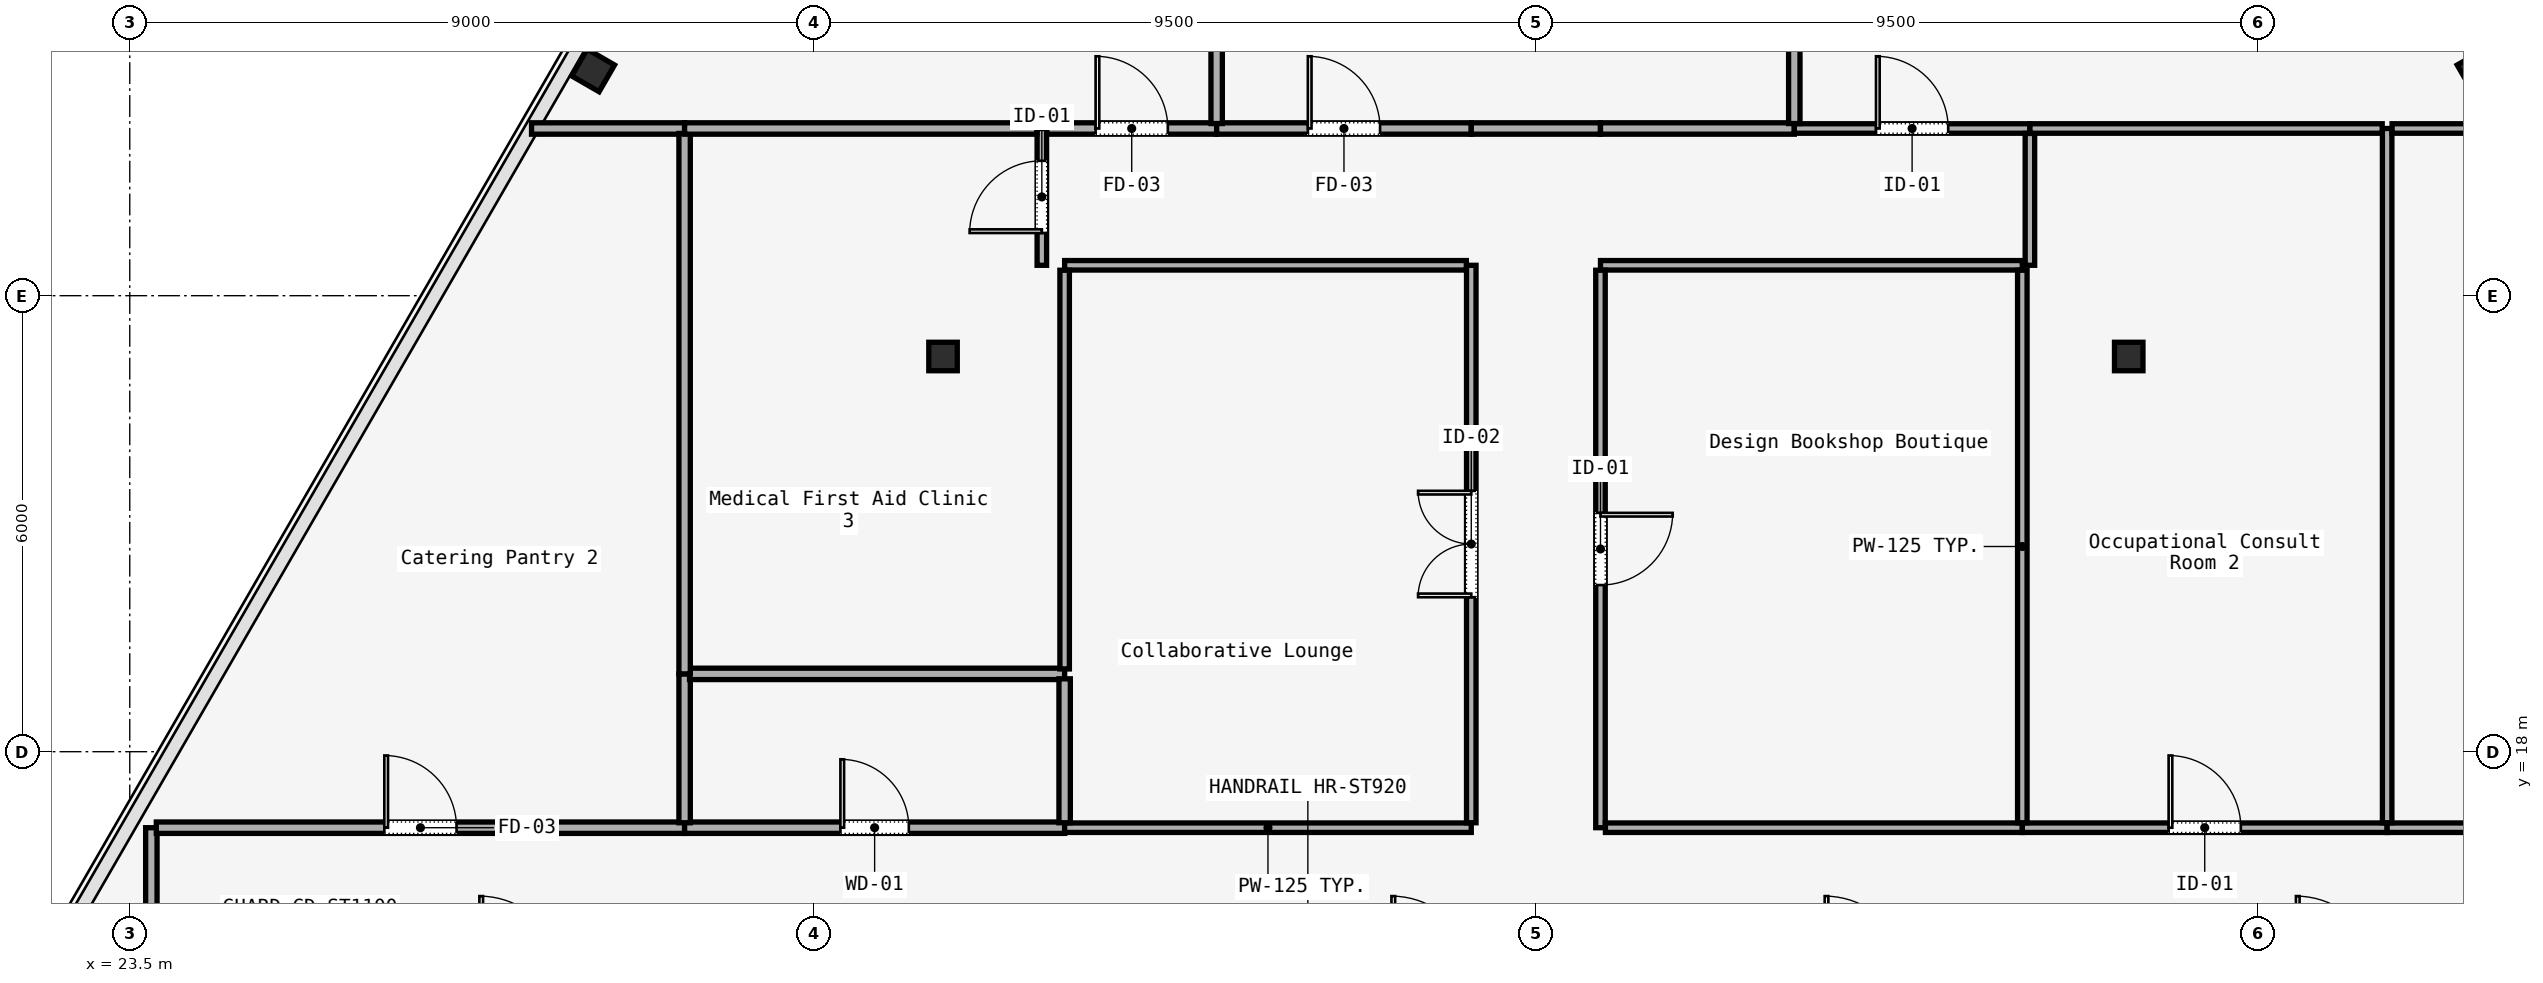
"""IFC4 building model, lengths in metres.
Left out: names, types, materials, properties, quantities, classifications, styles, units other than length and angle.
Written with IfcOpenShell. Run it as: python <this file> out.ifc"""

import sys

from ifc_helpers import new_model, si_unit, direction, frame, frame_2d, origin, origin_2d, place, context, subcontext, project, spatial, rectangle, i_section, extrude, element, fill, save


model = new_model("IFC4")
c1 = context("Model", 3, precision=1e-05, world=origin(), true_north=direction((0.0, 1.0)))
c2 = subcontext(c1, "Body", "Model", "MODEL_VIEW")
j1 = project(units=[si_unit("LENGTHUNIT", "METRE"), si_unit("PLANEANGLEUNIT", "RADIAN")], contexts=[c1])
p1 = place(None, origin())
s1 = spatial("IfcSite", under=j1, at=p1, CompositionType="ELEMENT")
p2 = place(p1, origin())
s2 = spatial("IfcBuilding", under=s1, at=p2, CompositionType="ELEMENT")
p3 = place(p2, frame((0.0, 0.0, 263.6)))
s3 = spatial("IfcBuildingStorey", under=s2, at=p3, CompositionType="ELEMENT", Elevation=263.6)
for number, where, z_axis, x_axis in (
    (1, (34.2, 23.2, 0.0), (0.0, 0.0, 1.0), (1.0, 0.0, 0.0)),
    (2, (49.8, 23.2, 0.0), (0.0, 0.0, 1.0), (1.0, 0.0, 0.0)),
):
    element("IfcColumn", number, at=place(p3, frame(where, z_axis=z_axis, x_axis=x_axis)), inside=s3, PredefinedType="COLUMN", context=c2, shape_type="SweptSolid", body=[
        extrude(i_section(OverallWidth=0.375, OverallDepth=0.375, WebThickness=0.017, FlangeThickness=0.027, FilletRadius=0.015, at=origin_2d()), origin(), (0.0, 0.0, 1.0), 3.58),
    ])
for number, where, z_axis, x_axis in (
    (3, (54.404, 26.964, 0.0), (0.0, 0.0, 1.0), (-0.5, 0.866, 0.0)),
    (4, (29.596, 26.964, 0.0), (0.0, 0.0, 1.0), (0.5, 0.866, 0.0)),
):
    element("IfcColumn", number, at=place(p3, frame(where, z_axis=z_axis, x_axis=x_axis)), inside=s3, PredefinedType="COLUMN", context=c2, shape_type="SweptSolid", body=[
        extrude(i_section(OverallWidth=0.406, OverallDepth=0.416, WebThickness=0.03, FlangeThickness=0.037, FilletRadius=0.015, at=origin_2d()), origin(), (0.0, 0.0, 1.0), 3.58),
    ])
p4 = place(p3, frame((23.784, 15.215, 0.0), z_axis=(0.0, 0.0, 1.0), x_axis=(0.0, 1.0, 0.0)))
e5 = element("IfcWall", 5, at=p4, inside=s3, PredefinedType="PARTITIONING", context=c2, shape_type="SweptSolid", body=[
    extrude(rectangle(XDim=1.785, YDim=0.15, at=frame_2d((0.893, 0.0))), origin(), (0.0, 0.0, 1.0), 3.01),
])
p5 = place(p3, frame((23.849, 17.0, 0.0), z_axis=(0.0, 0.0, 1.0), x_axis=(1.0, 0.0, 0.0)))
e6 = element("IfcWall", 6, at=p5, inside=s3, PredefinedType="PARTITIONING", context=c2, shape_type="SweptSolid", body=[
    extrude(rectangle(XDim=6.951, YDim=0.15, at=frame_2d((3.476, 0.0))), origin(), (0.0, 0.0, 1.0), 3.01),
])
p6 = place(p5, frame((3.0, 0.0, 0.0)))
e7 = element("IfcOpeningElement", 7, at=p6, cuts=e6, PredefinedType="OPENING", context=c2, shape_type="SweptSolid", body=[
    extrude(rectangle(XDim=0.95, YDim=2.2, at=frame_2d((0.475, 1.1))), frame((0.0, 0.075, 0.0), z_axis=(0.0, -1.0, 0.0), x_axis=(1.0, 0.0, 0.0)), (0.0, 0.0, 1.0), 0.15),
])
p7 = place(p3, frame((30.8, 17.0, 0.0), z_axis=(0.0, 0.0, 1.0), x_axis=(1.0, 0.0, 0.0)))
e8 = element("IfcWall", 8, at=p7, inside=s3, PredefinedType="PARTITIONING", context=c2, shape_type="SweptSolid", body=[
    extrude(rectangle(XDim=5.0, YDim=0.15, at=frame_2d((2.5, 0.0))), origin(), (0.0, 0.0, 1.0), 3.01),
])
p8 = place(p7, frame((2.05, 0.0, 0.0)))
e9 = element("IfcOpeningElement", 9, at=p8, cuts=e8, PredefinedType="OPENING", context=c2, shape_type="SweptSolid", body=[
    extrude(rectangle(XDim=0.9, YDim=2.15, at=frame_2d((0.45, 1.075))), frame((0.0, 0.075, 0.0), z_axis=(0.0, -1.0, 0.0), x_axis=(1.0, 0.0, 0.0)), (0.0, 0.0, 1.0), 0.15),
])
p9 = place(p3, frame((35.8, 17.0, 0.0), z_axis=(0.0, 0.0, 1.0), x_axis=(1.0, 0.0, 0.0)))
e10 = element("IfcWall", 10, at=p9, inside=s3, PredefinedType="PARTITIONING", context=c2, shape_type="SweptSolid", body=[
    extrude(rectangle(XDim=5.35, YDim=0.125, at=frame_2d((2.675, 0.0))), origin(), (0.0, 0.0, 1.0), 3.01),
])
p10 = place(p3, frame((41.15, 17.065, 0.0), z_axis=(0.0, 0.0, 1.0), x_axis=(0.0, 1.0, 0.0)))
e11 = element("IfcWall", 11, at=p10, inside=s3, PredefinedType="PARTITIONING", context=c2, shape_type="SweptSolid", body=[
    extrude(rectangle(XDim=7.335, YDim=0.125, at=frame_2d((3.667, 0.0))), origin(), (0.0, 0.0, 1.0), 3.01),
])
p11 = place(p10, frame((2.968, 0.0, 0.0)))
e12 = element("IfcOpeningElement", 12, at=p11, cuts=e11, PredefinedType="OPENING", context=c2, shape_type="SweptSolid", body=[
    extrude(rectangle(XDim=1.4, YDim=2.2, at=frame_2d((0.7, 1.1))), frame((0.0, 0.062, 0.0), z_axis=(0.0, -1.0, 0.0), x_axis=(1.0, 0.0, 0.0)), (0.0, 0.0, 1.0), 0.125),
])
p12 = place(p3, frame((41.085, 24.4, 0.0), z_axis=(0.0, 0.0, 1.0), x_axis=(-1.0, 0.0, 0.0)))
e13 = element("IfcWall", 13, at=p12, inside=s3, PredefinedType="PARTITIONING", context=c2, shape_type="SweptSolid", body=[
    extrude(rectangle(XDim=5.285, YDim=0.125, at=frame_2d((2.643, 0.0))), origin(), (0.0, 0.0, 1.0), 3.01),
])
p13 = place(p3, frame((35.5, 24.4, 0.0), z_axis=(0.0, 0.0, 1.0), x_axis=(0.0, 1.0, 0.0)))
e14 = element("IfcWall", 14, at=p13, inside=s3, PredefinedType="PARTITIONING", context=c2, shape_type="SweptSolid", body=[
    extrude(rectangle(XDim=1.8, YDim=0.125, at=frame_2d((0.9, 0.0))), origin(), (0.0, 0.0, 1.0), 3.01),
])
p14 = place(p13, frame((0.425, 0.0, 0.0)))
e15 = element("IfcOpeningElement", 15, at=p14, cuts=e14, PredefinedType="OPENING", context=c2, shape_type="SweptSolid", body=[
    extrude(rectangle(XDim=0.95, YDim=2.2, at=frame_2d((0.475, 1.1))), frame((0.0, 0.062, 0.0), z_axis=(0.0, -1.0, 0.0), x_axis=(1.0, 0.0, 0.0)), (0.0, 0.0, 1.0), 0.125),
])
p15 = place(p3, frame((35.565, 26.2, 0.0), z_axis=(0.0, 0.0, 1.0), x_axis=(1.0, 0.0, 0.0)))
e16 = element("IfcWall", 16, at=p15, inside=s3, PredefinedType="PARTITIONING", context=c2, shape_type="SweptSolid", body=[
    extrude(rectangle(XDim=2.235, YDim=0.15, at=frame_2d((1.118, 0.0))), origin(), (0.0, 0.0, 1.0), 3.01),
])
p16 = place(p15, frame((0.643, 0.0, 0.0)))
e17 = element("IfcOpeningElement", 17, at=p16, cuts=e16, PredefinedType="OPENING", context=c2, shape_type="SweptSolid", body=[
    extrude(rectangle(XDim=0.95, YDim=2.2, at=frame_2d((0.475, 1.1))), frame((0.0, 0.075, 0.0), z_axis=(0.0, -1.0, 0.0), x_axis=(1.0, 0.0, 0.0)), (0.0, 0.0, 1.0), 0.15),
])
p17 = place(p3, frame((37.8, 26.2, 0.0), z_axis=(0.0, 0.0, 1.0), x_axis=(1.0, 0.0, 0.0)))
e18 = element("IfcWall", 18, at=p17, inside=s3, PredefinedType="PARTITIONING", context=c2, shape_type="SweptSolid", body=[
    extrude(rectangle(XDim=3.35, YDim=0.15, at=frame_2d((1.675, 0.0))), origin(), (0.0, 0.0, 1.0), 3.01),
])
p18 = place(p17, frame((1.2, 0.0, 0.0)))
e19 = element("IfcOpeningElement", 19, at=p18, cuts=e18, PredefinedType="OPENING", context=c2, shape_type="SweptSolid", body=[
    extrude(rectangle(XDim=0.95, YDim=2.2, at=frame_2d((0.475, 1.1))), frame((0.0, 0.075, 0.0), z_axis=(0.0, -1.0, 0.0), x_axis=(1.0, 0.0, 0.0)), (0.0, 0.0, 1.0), 0.15),
])
p19 = place(p3, frame((41.15, 26.2, 0.0), z_axis=(0.0, 0.0, 1.0), x_axis=(1.0, 0.0, 0.0)))
e20 = element("IfcWall", 20, at=p19, inside=s3, PredefinedType="PARTITIONING", context=c2, shape_type="SweptSolid", body=[
    extrude(rectangle(XDim=1.7, YDim=0.15, at=frame_2d((0.85, 0.0))), origin(), (0.0, 0.0, 1.0), 3.01),
])
p20 = place(p3, frame((42.85, 26.2, 0.0), z_axis=(0.0, 0.0, 1.0), x_axis=(1.0, 0.0, 0.0)))
e21 = element("IfcWall", 21, at=p20, inside=s3, PredefinedType="PARTITIONING", context=c2, shape_type="SweptSolid", body=[
    extrude(rectangle(XDim=2.55, YDim=0.15, at=frame_2d((1.275, 0.0))), origin(), (0.0, 0.0, 1.0), 3.01),
])
p21 = place(p3, frame((45.4, 26.2, 0.0), z_axis=(0.0, 0.0, 1.0), x_axis=(1.0, 0.0, 0.0)))
e22 = element("IfcWall", 22, at=p21, inside=s3, PredefinedType="PARTITIONING", context=c2, shape_type="SweptSolid", body=[
    extrude(rectangle(XDim=3.1, YDim=0.125, at=frame_2d((1.55, 0.0))), origin(), (0.0, 0.0, 1.0), 3.01),
])
p22 = place(p21, frame((1.075, 0.0, 0.0)))
e23 = element("IfcOpeningElement", 23, at=p22, cuts=e22, PredefinedType="OPENING", context=c2, shape_type="SweptSolid", body=[
    extrude(rectangle(XDim=0.95, YDim=2.2, at=frame_2d((0.475, 1.1))), frame((0.0, 0.062, 0.0), z_axis=(0.0, -1.0, 0.0), x_axis=(1.0, 0.0, 0.0)), (0.0, 0.0, 1.0), 0.125),
])
p23 = place(p3, frame((48.5, 26.135, 0.0), z_axis=(0.0, 0.0, 1.0), x_axis=(0.0, -1.0, 0.0)))
e24 = element("IfcWall", 24, at=p23, inside=s3, PredefinedType="PARTITIONING", context=c2, shape_type="SweptSolid", body=[
    extrude(rectangle(XDim=1.735, YDim=0.125, at=frame_2d((0.868, 0.0))), origin(), (0.0, 0.0, 1.0), 3.01),
])
p24 = place(p3, frame((48.4, 24.4, 0.0), z_axis=(0.0, 0.0, 1.0), x_axis=(-1.0, 0.0, 0.0)))
e25 = element("IfcWall", 25, at=p24, inside=s3, PredefinedType="PARTITIONING", context=c2, shape_type="SweptSolid", body=[
    extrude(rectangle(XDim=5.55, YDim=0.125, at=frame_2d((2.775, 0.0))), origin(), (0.0, 0.0, 1.0), 3.01),
])
p25 = place(p3, frame((42.85, 24.335, 0.0), z_axis=(0.0, 0.0, 1.0), x_axis=(0.0, -1.0, 0.0)))
e26 = element("IfcWall", 26, at=p25, inside=s3, PredefinedType="PARTITIONING", context=c2, shape_type="SweptSolid", body=[
    extrude(rectangle(XDim=7.335, YDim=0.125, at=frame_2d((3.667, 0.0))), origin(), (0.0, 0.0, 1.0), 3.01),
])
p26 = place(p25, frame((3.192, 0.0, 0.0)))
e27 = element("IfcOpeningElement", 27, at=p26, cuts=e26, PredefinedType="OPENING", context=c2, shape_type="SweptSolid", body=[
    extrude(rectangle(XDim=0.95, YDim=2.2, at=frame_2d((0.475, 1.1))), frame((0.0, 0.062, 0.0), z_axis=(0.0, -1.0, 0.0), x_axis=(1.0, 0.0, 0.0)), (0.0, 0.0, 1.0), 0.125),
])
p27 = place(p3, frame((42.915, 17.0, 0.0), z_axis=(0.0, 0.0, 1.0), x_axis=(1.0, 0.0, 0.0)))
e28 = element("IfcWall", 28, at=p27, inside=s3, PredefinedType="PARTITIONING", context=c2, shape_type="SweptSolid", body=[
    extrude(rectangle(XDim=5.485, YDim=0.125, at=frame_2d((2.742, 0.0))), origin(), (0.0, 0.0, 1.0), 3.01),
])
p28 = place(p3, frame((48.4, 17.0, 0.0), z_axis=(0.0, 0.0, 1.0), x_axis=(1.0, 0.0, 0.0)))
e29 = element("IfcWall", 29, at=p28, inside=s3, PredefinedType="PARTITIONING", context=c2, shape_type="SweptSolid", body=[
    extrude(rectangle(XDim=4.8, YDim=0.125, at=frame_2d((2.4, 0.0))), origin(), (0.0, 0.0, 1.0), 3.01),
])
p29 = place(p28, frame((1.925, 0.0, 0.0)))
e30 = element("IfcOpeningElement", 30, at=p29, cuts=e29, PredefinedType="OPENING", context=c2, shape_type="SweptSolid", body=[
    extrude(rectangle(XDim=0.95, YDim=2.2, at=frame_2d((0.475, 1.1))), frame((0.0, 0.062, 0.0), z_axis=(0.0, -1.0, 0.0), x_axis=(1.0, 0.0, 0.0)), (0.0, 0.0, 1.0), 0.125),
])
p30 = place(p3, frame((53.2, 17.0, 0.0), z_axis=(0.0, 0.0, 1.0), x_axis=(1.0, 0.0, 0.0)))
e31 = element("IfcWall", 31, at=p30, inside=s3, PredefinedType="PARTITIONING", context=c2, shape_type="SweptSolid", body=[
    extrude(rectangle(XDim=6.951, YDim=0.125, at=frame_2d((3.476, 0.0))), origin(), (0.0, 0.0, 1.0), 3.01),
])
p31 = place(p30, frame((3.0, 0.0, 0.0)))
e32 = element("IfcOpeningElement", 32, at=p31, cuts=e31, PredefinedType="OPENING", context=c2, shape_type="SweptSolid", body=[
    extrude(rectangle(XDim=0.95, YDim=2.2, at=frame_2d((0.475, 1.1))), frame((0.0, 0.062, 0.0), z_axis=(0.0, -1.0, 0.0), x_axis=(1.0, 0.0, 0.0)), (0.0, 0.0, 1.0), 0.125),
])
p32 = place(p3, frame((30.8, 17.065, 0.0), z_axis=(0.0, 0.0, 1.0), x_axis=(0.0, 1.0, 0.0)))
e33 = element("IfcWall", 33, at=p32, inside=s3, PredefinedType="PARTITIONING", context=c2, shape_type="SweptSolid", body=[
    extrude(rectangle(XDim=1.959, YDim=0.15, at=frame_2d((0.979, 0.0))), origin(), (0.0, 0.0, 1.0), 3.01),
])
p33 = place(p3, frame((30.865, 19.024, 0.0), z_axis=(0.0, 0.0, 1.0), x_axis=(1.0, 0.0, 0.0)))
e34 = element("IfcWall", 34, at=p33, inside=s3, PredefinedType="PARTITIONING", context=c2, shape_type="SweptSolid", body=[
    extrude(rectangle(XDim=4.935, YDim=0.15, at=frame_2d((2.468, 0.0))), origin(), (0.0, 0.0, 1.0), 3.01),
])
p34 = place(p3, frame((35.8, 18.959, 0.0), z_axis=(0.0, 0.0, 1.0), x_axis=(0.0, -1.0, 0.0)))
e35 = element("IfcWall", 35, at=p34, inside=s3, PredefinedType="PARTITIONING", context=c2, shape_type="SweptSolid", body=[
    extrude(rectangle(XDim=1.894, YDim=0.15, at=frame_2d((0.947, 0.0))), origin(), (0.0, 0.0, 1.0), 3.01),
])
p35 = place(p3, frame((35.8, 19.089, 0.0), z_axis=(0.0, 0.0, 1.0), x_axis=(0.0, 1.0, 0.0)))
e36 = element("IfcWall", 36, at=p35, inside=s3, PredefinedType="PARTITIONING", context=c2, shape_type="SweptSolid", body=[
    extrude(rectangle(XDim=5.246, YDim=0.125, at=frame_2d((2.623, 0.0))), origin(), (0.0, 0.0, 1.0), 3.01),
])
p36 = place(p3, frame((48.4, 24.335, 0.0), z_axis=(0.0, 0.0, 1.0), x_axis=(0.0, -1.0, 0.0)))
e37 = element("IfcWall", 37, at=p36, inside=s3, PredefinedType="PARTITIONING", context=c2, shape_type="SweptSolid", body=[
    extrude(rectangle(XDim=7.27, YDim=0.125, at=frame_2d((3.635, 0.0))), origin(), (0.0, 0.0, 1.0), 3.01),
])
p37 = place(p3, frame((28.786, 26.2, 0.0), z_axis=(0.0, 0.0, 1.0), x_axis=(1.0, 0.0, 0.0)))
e38 = element("IfcWall", 38, at=p37, inside=s3, PredefinedType="PARTITIONING", context=c2, shape_type="SweptSolid", body=[
    extrude(rectangle(XDim=2.014, YDim=0.15, at=frame_2d((1.007, 0.0))), origin(), (0.0, 0.0, 1.0), 3.01),
])
p38 = place(p3, frame((30.8, 26.135, 0.0), z_axis=(0.0, 0.0, 1.0), x_axis=(0.0, -1.0, 0.0)))
e39 = element("IfcWall", 39, at=p38, inside=s3, PredefinedType="PARTITIONING", context=c2, shape_type="SweptSolid", body=[
    extrude(rectangle(XDim=7.111, YDim=0.15, at=frame_2d((3.556, 0.0))), origin(), (0.0, 0.0, 1.0), 3.01),
])
p39 = place(p3, frame((53.2, 17.065, 0.0), z_axis=(0.0, 0.0, 1.0), x_axis=(0.0, 1.0, 0.0)))
e40 = element("IfcWall", 40, at=p39, inside=s3, PredefinedType="PARTITIONING", context=c2, shape_type="SweptSolid", body=[
    extrude(rectangle(XDim=9.135, YDim=0.125, at=frame_2d((4.567, 0.0))), origin(), (0.0, 0.0, 1.0), 3.01),
])
p40 = place(p3, frame((53.265, 26.2, 0.0), z_axis=(0.0, 0.0, 1.0), x_axis=(1.0, 0.0, 0.0)))
e41 = element("IfcWall", 41, at=p40, inside=s3, PredefinedType="PARTITIONING", context=c2, shape_type="SweptSolid", body=[
    extrude(rectangle(XDim=1.949, YDim=0.125, at=frame_2d((0.975, 0.0))), origin(), (0.0, 0.0, 1.0), 3.01),
])
p41 = place(p3, frame((48.5, 26.2, 0.0), z_axis=(0.0, 0.0, 1.0), x_axis=(1.0, 0.0, 0.0)))
e42 = element("IfcWall", 42, at=p41, inside=s3, PredefinedType="PARTITIONING", context=c2, shape_type="SweptSolid", body=[
    extrude(rectangle(XDim=4.635, YDim=0.125, at=frame_2d((2.317, 0.0))), origin(), (0.0, 0.0, 1.0), 3.01),
])
p42 = place(p3, frame((30.8, 26.2, 0.0), z_axis=(0.0, 0.0, 1.0), x_axis=(1.0, 0.0, 0.0)))
e43 = element("IfcWall", 43, at=p42, inside=s3, PredefinedType="PARTITIONING", context=c2, shape_type="SweptSolid", body=[
    extrude(rectangle(XDim=4.635, YDim=0.15, at=frame_2d((2.317, 0.0))), origin(), (0.0, 0.0, 1.0), 3.01),
])
p43 = place(p3, frame((37.8, 41.813, 0.0), z_axis=(0.0, 0.0, 1.0), x_axis=(0.0, -1.0, 0.0)))
e44 = element("IfcWall", 44, at=p43, inside=s3, PredefinedType="PARTITIONING", context=c2, shape_type="SweptSolid", body=[
    extrude(rectangle(XDim=15.548, YDim=0.15, at=frame_2d((7.774, 0.0))), origin(), (0.0, 0.0, 1.0), 3.01),
])
p44 = place(p3, frame((45.4, 26.265, 0.0), z_axis=(0.0, 0.0, 1.0), x_axis=(0.0, 1.0, 0.0)))
e45 = element("IfcWall", 45, at=p44, inside=s3, PredefinedType="PARTITIONING", context=c2, shape_type="SweptSolid", body=[
    extrude(rectangle(XDim=16.933, YDim=0.15, at=frame_2d((8.467, 0.0))), origin(), (0.0, 0.0, 1.0), 3.01),
])
p45 = place(p8, origin())
e46 = element("IfcDoor", 46, at=p45, inside=s3, OperationType="SINGLE_SWING_RIGHT", PredefinedType="DOOR", context=c2, shape_type="SweptSolid", body=[
    extrude(rectangle(XDim=0.9, YDim=2.15, at=frame_2d((0.45, 1.075))), frame((0.0, 0.025, 0.0), z_axis=(0.0, -1.0, 0.0), x_axis=(1.0, 0.0, 0.0)), (0.0, 0.0, 1.0), 0.05),
])
fill(e9, e46)
p46 = place(p11, origin())
e47 = element("IfcDoor", 47, at=p46, inside=s3, OperationType="SINGLE_SWING_LEFT", PredefinedType="DOOR", context=c2, shape_type="SweptSolid", body=[
    extrude(rectangle(XDim=1.4, YDim=2.2, at=frame_2d((0.7, 1.1))), frame((0.0, 0.025, 0.0), z_axis=(0.0, -1.0, 0.0), x_axis=(1.0, 0.0, 0.0)), (0.0, 0.0, 1.0), 0.05),
])
fill(e12, e47)
p47 = place(p26, origin())
e48 = element("IfcDoor", 48, at=p47, inside=s3, OperationType="SINGLE_SWING_RIGHT", PredefinedType="DOOR", context=c2, shape_type="SweptSolid", body=[
    extrude(rectangle(XDim=0.95, YDim=2.2, at=frame_2d((0.475, 1.1))), frame((0.0, 0.025, 0.0), z_axis=(0.0, -1.0, 0.0), x_axis=(1.0, 0.0, 0.0)), (0.0, 0.0, 1.0), 0.05),
])
fill(e27, e48)
p48 = place(p6, origin())
e49 = element("IfcDoor", 49, at=p48, inside=s3, OperationType="SINGLE_SWING_LEFT", PredefinedType="DOOR", context=c2, shape_type="SweptSolid", body=[
    extrude(rectangle(XDim=0.95, YDim=2.2, at=frame_2d((0.475, 1.1))), frame((0.0, 0.025, 0.0), z_axis=(0.0, -1.0, 0.0), x_axis=(1.0, 0.0, 0.0)), (0.0, 0.0, 1.0), 0.05),
])
fill(e7, e49)
p49 = place(p29, origin())
e50 = element("IfcDoor", 50, at=p49, inside=s3, OperationType="SINGLE_SWING_LEFT", PredefinedType="DOOR", context=c2, shape_type="SweptSolid", body=[
    extrude(rectangle(XDim=0.95, YDim=2.2, at=frame_2d((0.475, 1.1))), frame((0.0, 0.025, 0.0), z_axis=(0.0, -1.0, 0.0), x_axis=(1.0, 0.0, 0.0)), (0.0, 0.0, 1.0), 0.05),
])
fill(e30, e50)
p50 = place(p14, origin())
e51 = element("IfcDoor", 51, at=p50, inside=s3, OperationType="SINGLE_SWING_RIGHT", PredefinedType="DOOR", context=c2, shape_type="SweptSolid", body=[
    extrude(rectangle(XDim=0.95, YDim=2.2, at=frame_2d((0.475, 1.1))), frame((0.0, 0.025, 0.0), z_axis=(0.0, -1.0, 0.0), x_axis=(1.0, 0.0, 0.0)), (0.0, 0.0, 1.0), 0.05),
])
fill(e15, e51)
p51 = place(p16, origin())
e52 = element("IfcDoor", 52, at=p51, inside=s3, OperationType="SINGLE_SWING_LEFT", PredefinedType="DOOR", context=c2, shape_type="SweptSolid", body=[
    extrude(rectangle(XDim=0.95, YDim=2.2, at=frame_2d((0.475, 1.1))), frame((0.0, 0.025, 0.0), z_axis=(0.0, -1.0, 0.0), x_axis=(1.0, 0.0, 0.0)), (0.0, 0.0, 1.0), 0.05),
])
fill(e17, e52)
p52 = place(p22, origin())
e53 = element("IfcDoor", 53, at=p52, inside=s3, OperationType="SINGLE_SWING_RIGHT", PredefinedType="DOOR", context=c2, shape_type="SweptSolid", body=[
    extrude(rectangle(XDim=0.95, YDim=2.2, at=frame_2d((0.475, 1.1))), frame((0.0, 0.025, 0.0), z_axis=(0.0, -1.0, 0.0), x_axis=(1.0, 0.0, 0.0)), (0.0, 0.0, 1.0), 0.05),
])
fill(e23, e53)
p53 = place(p18, origin())
e54 = element("IfcDoor", 54, at=p53, inside=s3, OperationType="SINGLE_SWING_LEFT", PredefinedType="DOOR", context=c2, shape_type="SweptSolid", body=[
    extrude(rectangle(XDim=0.95, YDim=2.2, at=frame_2d((0.475, 1.1))), frame((0.0, 0.025, 0.0), z_axis=(0.0, -1.0, 0.0), x_axis=(1.0, 0.0, 0.0)), (0.0, 0.0, 1.0), 0.05),
])
fill(e19, e54)
save(model, sys.argv[1])
